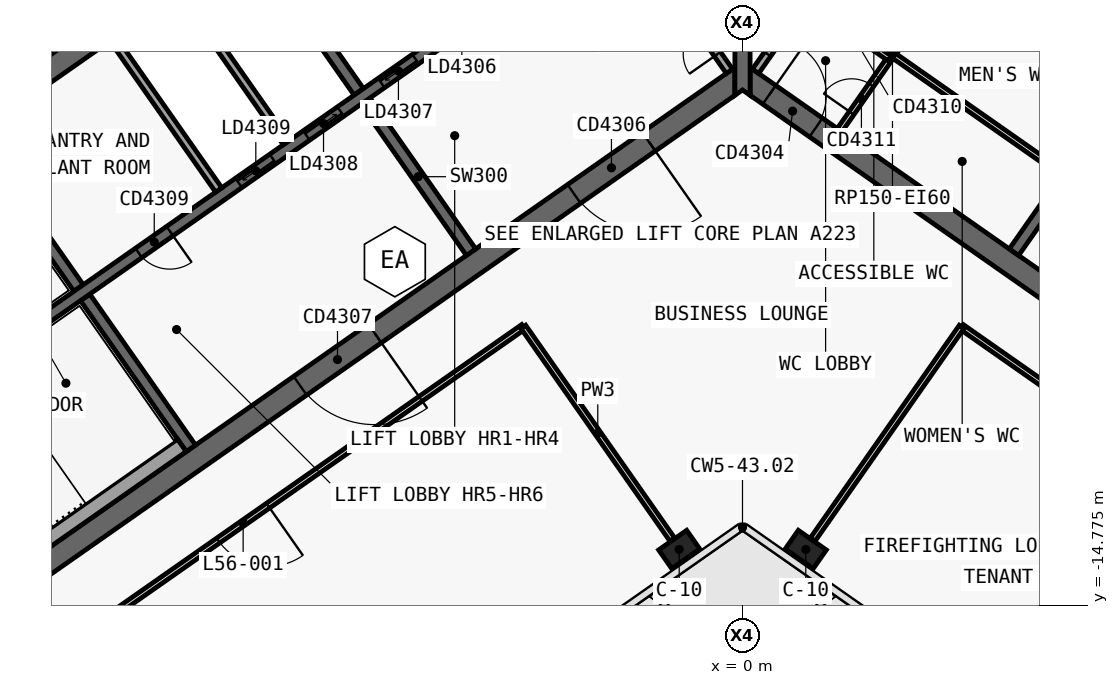
"""IFC4 building model, lengths in metres.
Left out: names, types, materials, properties, quantities, classifications, styles, units other than length and angle.
Written with IfcOpenShell. Run it as: python <this file> out.ifc"""

import sys

from ifc_helpers import new_model, si_unit, direction, frame, frame_2d, origin, origin_2d, place, context, subcontext, project, spatial, polyline, rectangle, outline, extrude, element, fill, save


model = new_model("IFC4")
c1 = context("Model", 3, precision=1e-05, world=origin(), true_north=direction((0.0, 1.0)))
c2 = subcontext(c1, "Body", "Model", "MODEL_VIEW")
j1 = project(units=[si_unit("LENGTHUNIT", "METRE"), si_unit("PLANEANGLEUNIT", "RADIAN")], contexts=[c1])
p1 = place(None, origin())
s1 = spatial("IfcSite", under=j1, at=p1, CompositionType="ELEMENT")
p2 = place(p1, origin())
s2 = spatial("IfcBuilding", under=s1, at=p2, CompositionType="ELEMENT")
p3 = place(p2, frame((0.0, 0.0, 241.0)))
s3 = spatial("IfcBuildingStorey", under=s2, at=p3, CompositionType="ELEMENT", Elevation=241.0)
p4 = place(p3, frame((-0.028, 12.066, 0.0), z_axis=(0.0, 0.0, 1.0), x_axis=(-0.819151382952, -0.573577380837, 0.0)))
e1 = element("IfcWall", 1, at=p4, inside=s3, PredefinedType="SHEAR", context=c2, shape_type="SweptSolid", body=[
    extrude(outline(polyline([(33.898, 0.3), (0.42, 0.3), (0.0, -0.3), (33.898, -0.3), (33.898, 0.3)])), origin(), (0.0, 0.0, 1.0), 3.9),
])
p5 = place(p3, frame((-0.028, -0.874, 0.0), z_axis=(0.0, 0.0, 1.0), x_axis=(-0.819150035022, -0.573579305871, 0.0)))
e2 = element("IfcWall", 2, at=p5, inside=s3, PredefinedType="SHEAR", context=c2, shape_type="SweptSolid", body=[
    extrude(outline(polyline([(26.476, 0.3), (0.42, 0.3), (0.0, -0.3), (26.476, -0.3), (26.476, 0.3)])), origin(), (0.0, 0.0, 1.0), 3.9),
])
p6 = place(p5, frame((2.976, 0.0, 0.0)))
e3 = element("IfcOpeningElement", 3, at=p6, cuts=e2, PredefinedType="OPENING", context=c2, shape_type="SweptSolid", body=[
    extrude(rectangle(XDim=2.4, YDim=2.1, at=frame_2d((1.2, 1.05))), frame((0.0, 0.31, 0.0), z_axis=(0.0, -1.0, 0.0), x_axis=(1.0, 0.0, 0.0)), (0.0, 0.0, 1.0), 0.62),
])
p7 = place(p5, frame((11.776, 0.0, 0.0)))
e4 = element("IfcOpeningElement", 4, at=p7, cuts=e2, PredefinedType="OPENING", context=c2, shape_type="SweptSolid", body=[
    extrude(rectangle(XDim=2.4, YDim=2.1, at=frame_2d((1.2, 1.05))), frame((0.0, 0.31, 0.0), z_axis=(0.0, -1.0, 0.0), x_axis=(1.0, 0.0, 0.0)), (0.0, 0.0, 1.0), 0.62),
])
p8 = place(p3, frame((-7.143, -5.49, 0.0), z_axis=(0.0, 0.0, 1.0), x_axis=(-0.573617744349, 0.819123118565, 0.0)))
e5 = element("IfcWall", 5, at=p8, inside=s3, PredefinedType="SHEAR", context=c2, shape_type="SweptSolid", body=[
    extrude(outline(polyline([(4.85, 0.15), (0.0, 0.15), (0.0, -0.15), (4.85, -0.15), (4.85, 0.15)])), origin(), (0.0, 0.0, 1.0), 3.9),
])
p9 = place(p3, frame((-10.097, -1.271, 0.0), z_axis=(0.0, 0.0, 1.0), x_axis=(-0.573560315113, 0.819163332265, 0.0)))
e6 = element("IfcWall", 6, at=p9, inside=s3, PredefinedType="SHEAR", context=c2, shape_type="SweptSolid", body=[
    extrude(outline(polyline([(4.85, -0.15), (4.85, 0.15), (0.0, 0.15), (0.0, -0.15), (4.85, -0.15)])), origin(), (0.0, 0.0, 1.0), 3.9),
])
p10 = place(p3, frame((-14.515, -10.652, 0.0), z_axis=(0.0, 0.0, 1.0), x_axis=(-0.573560315113, 0.819163332265, 0.0)))
e7 = element("IfcWall", 7, at=p10, inside=s3, PredefinedType="SHEAR", context=c2, shape_type="SweptSolid", body=[
    extrude(outline(polyline([(4.85, 0.15), (0.0, 0.15), (0.0, -0.15), (4.85, -0.15), (4.85, 0.15)])), origin(), (0.0, 0.0, 1.0), 3.9),
])
p11 = place(p3, frame((-17.469, -6.433, 0.0), z_axis=(0.0, 0.0, 1.0), x_axis=(-0.573594092424, 0.81913968109, 0.0)))
e8 = element("IfcWall", 8, at=p11, inside=s3, PredefinedType="SHEAR", context=c2, shape_type="SweptSolid", body=[
    extrude(outline(polyline([(4.85, -0.15), (4.85, 0.15), (0.0, 0.15), (0.0, -0.15), (4.85, -0.15)])), origin(), (0.0, 0.0, 1.0), 3.9),
])
p12 = place(p3, frame((-2.638, 3.768, 0.0), z_axis=(0.0, 0.0, 1.0), x_axis=(-0.819155014212, -0.573572194837, 0.0)))
e9 = element("IfcWall", 9, at=p12, inside=s3, PredefinedType="SHEAR", context=c2, shape_type="SweptSolid", body=[
    extrude(outline(polyline([(26.4, 0.15), (0.0, 0.15), (0.0, -0.15), (26.4, -0.15), (26.4, 0.15)])), origin(), (0.0, 0.0, 1.0), 3.9),
])
p13 = place(p12, frame((1.169, 0.0, 0.0)))
e10 = element("IfcOpeningElement", 10, at=p13, cuts=e9, PredefinedType="OPENING", context=c2, shape_type="SweptSolid", body=[
    extrude(rectangle(XDim=1.1, YDim=2.1, at=frame_2d((0.55, 1.05))), frame((0.0, 0.16, 0.0), z_axis=(0.0, -1.0, 0.0), x_axis=(1.0, 0.0, 0.0)), (0.0, 0.0, 1.0), 0.32),
])
p14 = place(p12, frame((3.206, 0.0, 0.0)))
e11 = element("IfcOpeningElement", 11, at=p14, cuts=e9, PredefinedType="OPENING", context=c2, shape_type="SweptSolid", body=[
    extrude(rectangle(XDim=1.1, YDim=2.1, at=frame_2d((0.55, 1.05))), frame((0.0, 0.16, 0.0), z_axis=(0.0, -1.0, 0.0), x_axis=(1.0, 0.0, 0.0)), (0.0, 0.0, 1.0), 0.32),
])
p15 = place(p12, frame((5.244, 0.0, 0.0)))
e12 = element("IfcOpeningElement", 12, at=p15, cuts=e9, PredefinedType="OPENING", context=c2, shape_type="SweptSolid", body=[
    extrude(rectangle(XDim=1.1, YDim=2.1, at=frame_2d((0.55, 1.05))), frame((0.0, 0.16, 0.0), z_axis=(0.0, -1.0, 0.0), x_axis=(1.0, 0.0, 0.0)), (0.0, 0.0, 1.0), 0.32),
])
p16 = place(p12, frame((7.281, 0.0, 0.0)))
e13 = element("IfcOpeningElement", 13, at=p16, cuts=e9, PredefinedType="OPENING", context=c2, shape_type="SweptSolid", body=[
    extrude(rectangle(XDim=1.1, YDim=2.1, at=frame_2d((0.55, 1.05))), frame((0.0, 0.16, 0.0), z_axis=(0.0, -1.0, 0.0), x_axis=(1.0, 0.0, 0.0)), (0.0, 0.0, 1.0), 0.32),
])
p17 = place(p12, frame((9.688, 0.0, 0.0)))
e14 = element("IfcOpeningElement", 14, at=p17, cuts=e9, PredefinedType="OPENING", context=c2, shape_type="SweptSolid", body=[
    extrude(rectangle(XDim=1.1, YDim=2.1, at=frame_2d((0.55, 1.05))), frame((0.0, 0.16, 0.0), z_axis=(0.0, -1.0, 0.0), x_axis=(1.0, 0.0, 0.0)), (0.0, 0.0, 1.0), 0.32),
])
p18 = place(p12, frame((11.863, 0.0, 0.0)))
e15 = element("IfcOpeningElement", 15, at=p18, cuts=e9, PredefinedType="OPENING", context=c2, shape_type="SweptSolid", body=[
    extrude(rectangle(XDim=1.1, YDim=2.1, at=frame_2d((0.55, 1.05))), frame((0.0, 0.16, 0.0), z_axis=(0.0, -1.0, 0.0), x_axis=(1.0, 0.0, 0.0)), (0.0, 0.0, 1.0), 0.32),
])
p19 = place(p12, frame((15.175, 0.0, 0.0)))
e16 = element("IfcOpeningElement", 16, at=p19, cuts=e9, PredefinedType="OPENING", context=c2, shape_type="SweptSolid", body=[
    extrude(rectangle(XDim=1.0, YDim=2.1, at=frame_2d((0.5, 1.05))), frame((0.0, 0.16, 0.0), z_axis=(0.0, -1.0, 0.0), x_axis=(1.0, 0.0, 0.0)), (0.0, 0.0, 1.0), 0.32),
])
p20 = place(p3, frame((0.028, 12.066, 0.0), z_axis=(0.0, 0.0, 1.0), x_axis=(0.819151382952, -0.573577380837, 0.0)))
e17 = element("IfcWall", 17, at=p20, inside=s3, PredefinedType="SHEAR", context=c2, shape_type="SweptSolid", body=[
    extrude(outline(polyline([(33.898, 0.3), (0.0, 0.3), (0.42, -0.3), (33.898, -0.3), (33.898, 0.3)])), origin(), (0.0, 0.0, 1.0), 3.9),
])
p21 = place(p3, frame((0.028, -0.874, 0.0), z_axis=(0.0, 0.0, 1.0), x_axis=(0.819150035022, -0.573579305871, 0.0)))
e18 = element("IfcWall", 18, at=p21, inside=s3, PredefinedType="SHEAR", context=c2, shape_type="SweptSolid", body=[
    extrude(outline(polyline([(26.476, 0.3), (0.0, 0.3), (0.42, -0.3), (26.476, -0.3), (26.476, 0.3)])), origin(), (0.0, 0.0, 1.0), 3.9),
])
p22 = place(p21, frame((0.826, 0.0, 0.0)))
e19 = element("IfcOpeningElement", 19, at=p22, cuts=e18, PredefinedType="OPENING", context=c2, shape_type="SweptSolid", body=[
    extrude(rectangle(XDim=1.5, YDim=2.1, at=frame_2d((0.75, 1.05))), frame((0.0, 0.31, 0.0), z_axis=(0.0, -1.0, 0.0), x_axis=(1.0, 0.0, 0.0)), (0.0, 0.0, 1.0), 0.62),
])
p23 = place(p21, frame((12.226, 0.0, 0.0)))
e20 = element("IfcOpeningElement", 20, at=p23, cuts=e18, PredefinedType="OPENING", context=c2, shape_type="SweptSolid", body=[
    extrude(rectangle(XDim=1.5, YDim=2.1, at=frame_2d((0.75, 1.05))), frame((0.0, 0.31, 0.0), z_axis=(0.0, -1.0, 0.0), x_axis=(1.0, 0.0, 0.0)), (0.0, 0.0, 1.0), 0.62),
])
p24 = place(p3, frame((7.143, -5.49, 0.0), z_axis=(0.0, 0.0, 1.0), x_axis=(0.573617744349, 0.819123118565, 0.0)))
e21 = element("IfcWall", 21, at=p24, inside=s3, PredefinedType="SHEAR", context=c2, shape_type="SweptSolid", body=[
    extrude(outline(polyline([(0.0, 0.15), (0.0, -0.15), (4.85, -0.15), (4.85, 0.15), (0.0, 0.15)])), origin(), (0.0, 0.0, 1.0), 3.9),
])
p25 = place(p3, frame((2.638, 3.768, 0.0), z_axis=(0.0, 0.0, 1.0), x_axis=(0.819155014212, -0.573572194837, 0.0)))
e22 = element("IfcWall", 22, at=p25, inside=s3, PredefinedType="SHEAR", context=c2, shape_type="SweptSolid", body=[
    extrude(outline(polyline([(0.0, 0.15), (0.0, -0.15), (26.4, -0.15), (26.4, 0.15), (0.0, 0.15)])), origin(), (0.0, 0.0, 1.0), 3.9),
])
p26 = place(p25, frame((9.637, 0.0, 0.0)))
e23 = element("IfcOpeningElement", 23, at=p26, cuts=e22, PredefinedType="OPENING", context=c2, shape_type="SweptSolid", body=[
    extrude(rectangle(XDim=1.2, YDim=2.1, at=frame_2d((0.6, 1.05))), frame((0.0, 0.16, 0.0), z_axis=(0.0, -1.0, 0.0), x_axis=(1.0, 0.0, 0.0)), (0.0, 0.0, 1.0), 0.32),
])
p27 = place(p25, frame((11.812, 0.0, 0.0)))
e24 = element("IfcOpeningElement", 24, at=p27, cuts=e22, PredefinedType="OPENING", context=c2, shape_type="SweptSolid", body=[
    extrude(rectangle(XDim=1.2, YDim=2.1, at=frame_2d((0.6, 1.05))), frame((0.0, 0.16, 0.0), z_axis=(0.0, -1.0, 0.0), x_axis=(1.0, 0.0, 0.0)), (0.0, 0.0, 1.0), 0.32),
])
p28 = place(p25, frame((13.988, 0.0, 0.0)))
e25 = element("IfcOpeningElement", 25, at=p28, cuts=e22, PredefinedType="OPENING", context=c2, shape_type="SweptSolid", body=[
    extrude(rectangle(XDim=1.2, YDim=2.1, at=frame_2d((0.6, 1.05))), frame((0.0, 0.16, 0.0), z_axis=(0.0, -1.0, 0.0), x_axis=(1.0, 0.0, 0.0)), (0.0, 0.0, 1.0), 0.32),
])
p29 = place(p25, frame((16.262, 0.0, 0.0)))
e26 = element("IfcOpeningElement", 26, at=p29, cuts=e22, PredefinedType="OPENING", context=c2, shape_type="SweptSolid", body=[
    extrude(rectangle(XDim=1.0, YDim=2.1, at=frame_2d((0.5, 1.05))), frame((0.0, 0.16, 0.0), z_axis=(0.0, -1.0, 0.0), x_axis=(1.0, 0.0, 0.0)), (0.0, 0.0, 1.0), 0.32),
])
p30 = place(p3, frame((0.0, -1.361, 0.0), z_axis=(0.0, 0.0, 1.0), x_axis=(0.0, 1.0, 0.0)))
e27 = element("IfcWall", 27, at=p30, inside=s3, PredefinedType="SHEAR", context=c2, shape_type="SweptSolid", body=[
    extrude(outline(polyline([(0.14, 0.2), (0.0, 0.2), (0.14, 0.0), (0.0, -0.2), (0.14, -0.2), (1.012, -0.2), (12.94, -0.2), (13.813, -0.2), (13.893, -0.2), (13.933, -0.172), (13.813, 0.0), (13.933, 0.172), (13.893, 0.2), (13.813, 0.2), (12.94, 0.2), (1.012, 0.2), (0.14, 0.2)])), origin(), (0.0, 0.0, 1.0), 3.9),
])
for number, where, z_axis, x_axis in (
    (28, (-1.665, -13.313, 0.0), (0.0, 0.0, 1.0), (-0.819, -0.574, 0.0)),
    (29, (1.665, -13.313, 0.0), (0.0, 0.0, 1.0), (0.819, -0.574, 0.0)),
):
    element("IfcColumn", number, at=place(p3, frame(where, z_axis=z_axis, x_axis=x_axis)), inside=s3, PredefinedType="COLUMN", context=c2, shape_type="SweptSolid", body=[
        extrude(rectangle(XDim=0.9, YDim=0.6, at=origin_2d()), origin(), (0.0, 0.0, 1.0), 3.9),
    ])
p31 = place(p3, frame((-12.001, -2.605, 0.0), z_axis=(0.0, 0.0, 1.0), x_axis=(-0.573560315113, 0.819163332265, 0.0)))
e30 = element("IfcWall", 30, at=p31, inside=s3, PredefinedType="SOLIDWALL", context=c2, shape_type="SweptSolid", body=[
    extrude(rectangle(XDim=4.85, YDim=0.2, at=frame_2d((2.425, 0.0))), origin(), (0.0, 0.0, 1.0), 3.9),
])
p32 = place(p3, frame((-13.783, -3.852, 0.0), z_axis=(0.0, 0.0, 1.0), x_axis=(-0.573594092424, 0.81913968109, 0.0)))
e31 = element("IfcWall", 31, at=p32, inside=s3, PredefinedType="SOLIDWALL", context=c2, shape_type="SweptSolid", body=[
    extrude(rectangle(XDim=4.85, YDim=0.2, at=frame_2d((2.425, 0.0))), origin(), (0.0, 0.0, 1.0), 3.9),
])
p33 = place(p3, frame((2.556, -2.278, 0.0), z_axis=(0.0, 0.0, 1.0), x_axis=(0.573560315113, 0.819163332265, 0.0)))
e32 = element("IfcWall", 32, at=p33, inside=s3, PredefinedType="PARTITIONING", context=c2, shape_type="SweptSolid", body=[
    extrude(rectangle(XDim=4.85, YDim=0.15, at=frame_2d((2.425, 0.0))), origin(), (0.0, 0.0, 1.0), 3.62),
])
p34 = place(p33, frame((0.55, 0.0, 0.0)))
e33 = element("IfcOpeningElement", 33, at=p34, cuts=e32, PredefinedType="OPENING", context=c2, shape_type="SweptSolid", body=[
    extrude(rectangle(XDim=0.9, YDim=2.1, at=frame_2d((0.45, 1.05))), frame((0.0, 0.085, 0.0), z_axis=(0.0, -1.0, 0.0), x_axis=(1.0, 0.0, 0.0)), (0.0, 0.0, 1.0), 0.17),
])
p35 = place(p33, frame((3.075, 0.0, 0.0)))
e34 = element("IfcOpeningElement", 34, at=p35, cuts=e32, PredefinedType="OPENING", context=c2, shape_type="SweptSolid", body=[
    extrude(rectangle(XDim=0.9, YDim=2.1, at=frame_2d((0.45, 1.05))), frame((0.0, 0.085, 0.0), z_axis=(0.0, -1.0, 0.0), x_axis=(1.0, 0.0, 0.0)), (0.0, 0.0, 1.0), 0.17),
])
p36 = place(p3, frame((1.745, 1.097, 0.0), z_axis=(0.0, 0.0, 1.0), x_axis=(0.819178980414, -0.573537965655, 0.0)))
e35 = element("IfcWall", 35, at=p36, inside=s3, PredefinedType="PARTITIONING", context=c2, shape_type="SweptSolid", body=[
    extrude(rectangle(XDim=2.6, YDim=0.15, at=frame_2d((1.3, 0.0))), origin(), (0.0, 0.0, 1.0), 3.62),
])
p37 = place(p36, frame((0.85, 0.0, 0.0)))
e36 = element("IfcOpeningElement", 36, at=p37, cuts=e35, PredefinedType="OPENING", context=c2, shape_type="SweptSolid", body=[
    extrude(rectangle(XDim=0.9, YDim=2.1, at=frame_2d((0.45, 1.05))), frame((0.0, 0.085, 0.0), z_axis=(0.0, -1.0, 0.0), x_axis=(1.0, 0.0, 0.0)), (0.0, 0.0, 1.0), 0.17),
])
p38 = place(p3, frame((3.947, -0.292, 0.0), z_axis=(0.0, 0.0, 1.0), x_axis=(0.819151939971, -0.573576585332, 0.0)))
e37 = element("IfcWall", 37, at=p38, inside=s3, PredefinedType="PARTITIONING", context=c2, shape_type="SweptSolid", body=[
    extrude(rectangle(XDim=5.45, YDim=0.15, at=frame_2d((2.725, 0.0))), origin(), (0.0, 0.0, 1.0), 3.62),
])
p39 = place(p3, frame((-14.753, -10.574, 0.0), z_axis=(0.0, 0.0, 1.0), x_axis=(-0.819158229677, -0.573567602601, 0.0)))
e38 = element("IfcWall", 38, at=p39, inside=s3, PredefinedType="SOLIDWALL", context=c2, shape_type="SweptSolid", body=[
    extrude(rectangle(XDim=8.25, YDim=0.4, at=frame_2d((4.125, 0.0))), origin(), (0.0, 0.0, 1.0), 3.62),
])
p40 = place(p3, frame((-0.344, -0.729, 0.0), z_axis=(0.0, 0.0, 1.0), x_axis=(-0.573560315113, 0.819163332265, 0.0)))
e39 = element("IfcWall", 39, at=p40, inside=s3, PredefinedType="SOLIDWALL", context=c2, shape_type="SweptSolid", body=[
    extrude(rectangle(XDim=4.85, YDim=0.2, at=frame_2d((2.425, 0.0))), origin(), (0.0, 0.0, 1.0), 3.62),
])
p41 = place(p40, frame((0.55, 0.0, 0.0)))
e40 = element("IfcOpeningElement", 40, at=p41, cuts=e39, PredefinedType="OPENING", context=c2, shape_type="SweptSolid", body=[
    extrude(rectangle(XDim=0.9, YDim=2.1, at=frame_2d((0.45, 1.05))), frame((0.0, 0.11, 0.0), z_axis=(0.0, -1.0, 0.0), x_axis=(1.0, 0.0, 0.0)), (0.0, 0.0, 1.0), 0.22),
])
p42 = place(p3, frame((0.344, -0.729, 0.0), z_axis=(0.0, 0.0, 1.0), x_axis=(0.573560315113, 0.819163332265, 0.0)))
e41 = element("IfcWall", 41, at=p42, inside=s3, PredefinedType="SOLIDWALL", context=c2, shape_type="SweptSolid", body=[
    extrude(rectangle(XDim=4.85, YDim=0.2, at=frame_2d((2.425, 0.0))), origin(), (0.0, 0.0, 1.0), 3.62),
])
p43 = place(p42, frame((0.55, 0.0, 0.0)))
e42 = element("IfcOpeningElement", 42, at=p43, cuts=e41, PredefinedType="OPENING", context=c2, shape_type="SweptSolid", body=[
    extrude(rectangle(XDim=0.9, YDim=2.1, at=frame_2d((0.45, 1.05))), frame((0.0, 0.11, 0.0), z_axis=(0.0, -1.0, 0.0), x_axis=(1.0, 0.0, 0.0)), (0.0, 0.0, 1.0), 0.22),
])
p44 = place(p3, frame((15.598, -14.34, 0.0), z_axis=(0.0, 0.0, 1.0), x_axis=(-0.81915546166, 0.573571555809, 0.0)))
e43 = element("IfcWall", 43, at=p44, inside=s3, PredefinedType="PARTITIONING", context=c2, shape_type="SweptSolid", body=[
    extrude(rectangle(XDim=12.002, YDim=0.15, at=frame_2d((6.001, 0.0))), origin(), (0.0, 0.0, 1.0), 3.05),
])
p45 = place(p44, frame((5.201, 0.0, 0.0)))
e44 = element("IfcOpeningElement", 44, at=p45, cuts=e43, PredefinedType="OPENING", context=c2, shape_type="SweptSolid", body=[
    extrude(rectangle(XDim=1.6, YDim=2.1, at=frame_2d((0.8, 1.05))), frame((0.0, 0.085, 0.0), z_axis=(0.0, -1.0, 0.0), x_axis=(1.0, 0.0, 0.0)), (0.0, 0.0, 1.0), 0.17),
])
p46 = place(p3, frame((-5.766, -7.456, 0.0), z_axis=(0.0, 0.0, 1.0), x_axis=(-0.819153544995, -0.573574293115, 0.0)))
e45 = element("IfcWall", 45, at=p46, inside=s3, PredefinedType="PARTITIONING", context=c2, shape_type="SweptSolid", body=[
    extrude(rectangle(XDim=18.002, YDim=0.15, at=frame_2d((9.001, 0.0))), origin(), (0.0, 0.0, 1.0), 3.05),
])
p47 = place(p46, frame((8.201, 0.0, 0.0)))
e46 = element("IfcOpeningElement", 46, at=p47, cuts=e45, PredefinedType="OPENING", context=c2, shape_type="SweptSolid", body=[
    extrude(rectangle(XDim=1.6, YDim=2.1, at=frame_2d((0.8, 1.05))), frame((0.0, 0.085, 0.0), z_axis=(0.0, -1.0, 0.0), x_axis=(1.0, 0.0, 0.0)), (0.0, 0.0, 1.0), 0.17),
])
p48 = place(p3, frame((1.849, -13.051, 0.0), z_axis=(0.0, 0.0, 1.0), x_axis=(0.573577493031, 0.819151304393, 0.0)))
e47 = element("IfcWall", 47, at=p48, inside=s3, PredefinedType="PARTITIONING", context=c2, shape_type="SweptSolid", body=[
    extrude(rectangle(XDim=6.83, YDim=0.15, at=frame_2d((3.415, 0.0))), origin(), (0.0, 0.0, 1.0), 3.05),
])
p49 = place(p3, frame((-1.849, -13.051, 0.0), z_axis=(0.0, 0.0, 1.0), x_axis=(-0.57357985571, 0.819149650018, 0.0)))
e48 = element("IfcWall", 48, at=p49, inside=s3, PredefinedType="PARTITIONING", context=c2, shape_type="SweptSolid", body=[
    extrude(rectangle(XDim=6.832, YDim=0.15, at=frame_2d((3.416, 0.0))), origin(), (0.0, 0.0, 1.0), 3.05),
])
p50 = place(p16, origin())
e49 = element("IfcDoor", 49, at=p50, inside=s3, OperationType="SLIDING_TO_RIGHT", PredefinedType="DOOR", context=c2, shape_type="SweptSolid", body=[
    extrude(rectangle(XDim=1.1, YDim=2.1, at=frame_2d((0.55, 1.05))), frame((0.0, 0.025, 0.0), z_axis=(0.0, -1.0, 0.0), x_axis=(1.0, 0.0, 0.0)), (0.0, 0.0, 1.0), 0.05),
])
fill(e13, e49)
p51 = place(p17, origin())
e50 = element("IfcDoor", 50, at=p51, inside=s3, OperationType="SLIDING_TO_LEFT", PredefinedType="DOOR", context=c2, shape_type="SweptSolid", body=[
    extrude(rectangle(XDim=1.1, YDim=2.1, at=frame_2d((0.55, 1.05))), frame((0.0, 0.025, 0.0), z_axis=(0.0, -1.0, 0.0), x_axis=(1.0, 0.0, 0.0)), (0.0, 0.0, 1.0), 0.05),
])
fill(e14, e50)
p52 = place(p18, origin())
e51 = element("IfcDoor", 51, at=p52, inside=s3, OperationType="SLIDING_TO_RIGHT", PredefinedType="DOOR", context=c2, shape_type="SweptSolid", body=[
    extrude(rectangle(XDim=1.1, YDim=2.1, at=frame_2d((0.55, 1.05))), frame((0.0, 0.025, 0.0), z_axis=(0.0, -1.0, 0.0), x_axis=(1.0, 0.0, 0.0)), (0.0, 0.0, 1.0), 0.05),
])
fill(e15, e51)
p53 = place(p19, origin())
e52 = element("IfcDoor", 52, at=p53, inside=s3, OperationType="SINGLE_SWING_RIGHT", PredefinedType="DOOR", context=c2, shape_type="SweptSolid", body=[
    extrude(rectangle(XDim=1.0, YDim=2.1, at=frame_2d((0.5, 1.05))), frame((0.0, 0.025, 0.0), z_axis=(0.0, -1.0, 0.0), x_axis=(1.0, 0.0, 0.0)), (0.0, 0.0, 1.0), 0.05),
])
fill(e16, e52)
p54 = place(p6, origin())
e53 = element("IfcDoor", 53, at=p54, inside=s3, OperationType="DOUBLE_DOOR_SINGLE_SWING", PredefinedType="DOOR", context=c2, shape_type="SweptSolid", body=[
    extrude(rectangle(XDim=2.4, YDim=2.1, at=frame_2d((1.2, 1.05))), frame((0.0, 0.025, 0.0), z_axis=(0.0, -1.0, 0.0), x_axis=(1.0, 0.0, 0.0)), (0.0, 0.0, 1.0), 0.05),
])
fill(e3, e53)
p55 = place(p7, origin())
e54 = element("IfcDoor", 54, at=p55, inside=s3, OperationType="DOUBLE_DOOR_SINGLE_SWING", PredefinedType="DOOR", context=c2, shape_type="SweptSolid", body=[
    extrude(rectangle(XDim=2.4, YDim=2.1, at=frame_2d((1.2, 1.05))), frame((0.0, 0.025, 0.0), z_axis=(0.0, -1.0, 0.0), x_axis=(1.0, 0.0, 0.0)), (0.0, 0.0, 1.0), 0.05),
])
fill(e4, e54)
p56 = place(p34, origin())
e55 = element("IfcDoor", 55, at=p56, inside=s3, OperationType="SINGLE_SWING_RIGHT", PredefinedType="DOOR", context=c2, shape_type="SweptSolid", body=[
    extrude(rectangle(XDim=0.9, YDim=2.1, at=frame_2d((0.45, 1.05))), frame((0.0, 0.025, 0.0), z_axis=(0.0, -1.0, 0.0), x_axis=(1.0, 0.0, 0.0)), (0.0, 0.0, 1.0), 0.05),
])
fill(e33, e55)
p57 = place(p22, origin())
e56 = element("IfcDoor", 56, at=p57, inside=s3, OperationType="SINGLE_SWING_RIGHT", PredefinedType="DOOR", context=c2, shape_type="SweptSolid", body=[
    extrude(rectangle(XDim=1.5, YDim=2.1, at=frame_2d((0.75, 1.05))), frame((0.0, 0.025, 0.0), z_axis=(0.0, -1.0, 0.0), x_axis=(1.0, 0.0, 0.0)), (0.0, 0.0, 1.0), 0.05),
])
fill(e19, e56)
p58 = place(p41, origin())
e57 = element("IfcDoor", 57, at=p58, inside=s3, OperationType="SINGLE_SWING_RIGHT", PredefinedType="DOOR", context=c2, shape_type="SweptSolid", body=[
    extrude(rectangle(XDim=0.9, YDim=2.1, at=frame_2d((0.45, 1.05))), frame((0.0, 0.025, 0.0), z_axis=(0.0, -1.0, 0.0), x_axis=(1.0, 0.0, 0.0)), (0.0, 0.0, 1.0), 0.05),
])
fill(e40, e57)
p59 = place(p43, origin())
e58 = element("IfcDoor", 58, at=p59, inside=s3, OperationType="SINGLE_SWING_RIGHT", PredefinedType="DOOR", context=c2, shape_type="SweptSolid", body=[
    extrude(rectangle(XDim=0.9, YDim=2.1, at=frame_2d((0.45, 1.05))), frame((0.0, 0.025, 0.0), z_axis=(0.0, -1.0, 0.0), x_axis=(1.0, 0.0, 0.0)), (0.0, 0.0, 1.0), 0.05),
])
fill(e42, e58)
p60 = place(p47, origin())
e59 = element("IfcDoor", 59, at=p60, inside=s3, OperationType="DOUBLE_DOOR_SINGLE_SWING", PredefinedType="DOOR", context=c2, shape_type="SweptSolid", body=[
    extrude(rectangle(XDim=1.6, YDim=2.1, at=frame_2d((0.8, 1.05))), frame((0.0, 0.025, 0.0), z_axis=(0.0, -1.0, 0.0), x_axis=(1.0, 0.0, 0.0)), (0.0, 0.0, 1.0), 0.05),
])
fill(e46, e59)
save(model, sys.argv[1])
